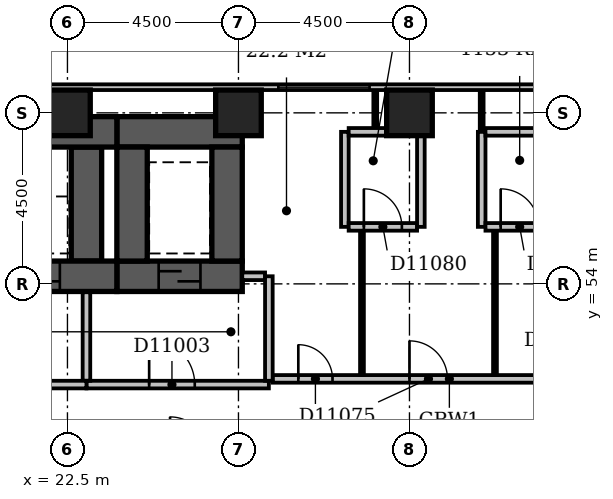
"""IFC4 building model, lengths in metres.
Left out: names, types, materials, properties, quantities, classifications, styles, units other than length and angle.
Written with IfcOpenShell. Run it as: python <this file> out.ifc"""

import sys

from ifc_helpers import new_model, si_unit, direction, frame, frame_2d, origin, origin_2d, place, context, subcontext, project, spatial, rectangle, extrude, element, fill, save


model = new_model("IFC4")
c1 = context("Model", 3, precision=1e-05, world=origin(), true_north=direction((0.0, 1.0)))
c2 = subcontext(c1, "Body", "Model", "MODEL_VIEW")
j1 = project(units=[si_unit("LENGTHUNIT", "METRE"), si_unit("PLANEANGLEUNIT", "RADIAN")], contexts=[c1])
p1 = place(None, origin())
s1 = spatial("IfcSite", under=j1, at=p1, CompositionType="ELEMENT")
p2 = place(p1, origin())
s2 = spatial("IfcBuilding", under=s1, at=p2, CompositionType="ELEMENT")
p3 = place(p2, frame((0.0, 0.0, 50.6)))
s3 = spatial("IfcBuildingStorey", under=s2, at=p3, CompositionType="ELEMENT", Elevation=50.6)
p4 = place(p3, frame((7.35, 54.2, -0.3), z_axis=(0.0, 0.0, 1.0), x_axis=(1.0, 0.0, 0.0)))
e1 = element("IfcWall", 1, at=p4, inside=s3, PredefinedType="SHEAR", context=c2, shape_type="SweptSolid", body=[
    extrude(rectangle(XDim=16.45, YDim=0.8, at=frame_2d((8.225, 0.0))), origin(), (0.0, 0.0, 1.0), 3.6),
])
p5 = place(p4, frame((1.35, 0.0, 0.3)))
e2 = element("IfcOpeningElement", 2, at=p5, cuts=e1, PredefinedType="OPENING", context=c2, shape_type="SweptSolid", body=[
    extrude(rectangle(XDim=1.1, YDim=2.1, at=frame_2d((0.55, 1.05))), frame((0.0, 0.412, 0.0), z_axis=(0.0, -1.0, 0.0), x_axis=(1.0, 0.0, 0.0)), (0.0, 0.0, 1.0), 0.824),
])
p6 = place(p4, frame((3.85, 0.0, 0.3)))
e3 = element("IfcOpeningElement", 3, at=p6, cuts=e1, PredefinedType="OPENING", context=c2, shape_type="SweptSolid", body=[
    extrude(rectangle(XDim=1.1, YDim=2.1, at=frame_2d((0.55, 1.05))), frame((0.0, 0.412, 0.0), z_axis=(0.0, -1.0, 0.0), x_axis=(1.0, 0.0, 0.0)), (0.0, 0.0, 1.0), 0.824),
])
p7 = place(p4, frame((6.35, 0.0, 0.3)))
e4 = element("IfcOpeningElement", 4, at=p7, cuts=e1, PredefinedType="OPENING", context=c2, shape_type="SweptSolid", body=[
    extrude(rectangle(XDim=1.1, YDim=2.1, at=frame_2d((0.55, 1.05))), frame((0.0, 0.412, 0.0), z_axis=(0.0, -1.0, 0.0), x_axis=(1.0, 0.0, 0.0)), (0.0, 0.0, 1.0), 0.824),
])
p8 = place(p4, frame((8.85, 0.0, 0.3)))
e5 = element("IfcOpeningElement", 5, at=p8, cuts=e1, PredefinedType="OPENING", context=c2, shape_type="SweptSolid", body=[
    extrude(rectangle(XDim=1.1, YDim=2.1, at=frame_2d((0.55, 1.05))), frame((0.0, 0.412, 0.0), z_axis=(0.0, -1.0, 0.0), x_axis=(1.0, 0.0, 0.0)), (0.0, 0.0, 1.0), 0.824),
])
p9 = place(p4, frame((11.35, 0.0, 0.3)))
e6 = element("IfcOpeningElement", 6, at=p9, cuts=e1, PredefinedType="OPENING", context=c2, shape_type="SweptSolid", body=[
    extrude(rectangle(XDim=1.1, YDim=2.1, at=frame_2d((0.55, 1.05))), frame((0.0, 0.412, 0.0), z_axis=(0.0, -1.0, 0.0), x_axis=(1.0, 0.0, 0.0)), (0.0, 0.0, 1.0), 0.824),
])
p10 = place(p4, frame((13.85, 0.0, 0.3)))
e7 = element("IfcOpeningElement", 7, at=p10, cuts=e1, PredefinedType="OPENING", context=c2, shape_type="SweptSolid", body=[
    extrude(rectangle(XDim=1.1, YDim=2.1, at=frame_2d((0.55, 1.05))), frame((0.0, 0.412, 0.0), z_axis=(0.0, -1.0, 0.0), x_axis=(1.0, 0.0, 0.0)), (0.0, 0.0, 1.0), 0.824),
])
p11 = place(p3, frame((7.35, 58.0, -0.3), z_axis=(0.0, 0.0, 1.0), x_axis=(1.0, 0.0, 0.0)))
e8 = element("IfcWall", 8, at=p11, inside=s3, PredefinedType="SHEAR", context=c2, shape_type="SweptSolid", body=[
    extrude(rectangle(XDim=16.45, YDim=0.8, at=frame_2d((8.225, 0.0))), origin(), (0.0, 0.0, 1.0), 3.6),
])
p12 = place(p3, frame((23.0, 54.6, -0.3), z_axis=(0.0, 0.0, 1.0), x_axis=(0.0, 1.0, 0.0)))
e9 = element("IfcWall", 9, at=p12, inside=s3, PredefinedType="SHEAR", context=c2, shape_type="SweptSolid", body=[
    extrude(rectangle(XDim=3.0, YDim=0.8, at=frame_2d((1.5, 0.0))), origin(), (0.0, 0.0, 1.0), 3.6),
])
p13 = place(p3, frame((23.8, 54.2, -0.3), z_axis=(0.0, 0.0, 1.0), x_axis=(1.0, 0.0, 0.0)))
e10 = element("IfcWall", 10, at=p13, inside=s3, PredefinedType="SHEAR", context=c2, shape_type="SweptSolid", body=[
    extrude(rectangle(XDim=3.3, YDim=0.8, at=frame_2d((1.65, 0.0))), origin(), (0.0, 0.0, 1.0), 3.6),
])
p14 = place(p13, frame((1.1, 0.0, 0.3)))
e11 = element("IfcOpeningElement", 11, at=p14, cuts=e10, PredefinedType="OPENING", context=c2, shape_type="SweptSolid", body=[
    extrude(rectangle(XDim=1.1, YDim=2.1, at=frame_2d((0.55, 1.05))), frame((0.0, 0.412, 0.0), z_axis=(0.0, -1.0, 0.0), x_axis=(1.0, 0.0, 0.0)), (0.0, 0.0, 1.0), 0.824),
])
p15 = place(p3, frame((23.8, 58.0, -0.3), z_axis=(0.0, 0.0, 1.0), x_axis=(1.0, 0.0, 0.0)))
e12 = element("IfcWall", 12, at=p15, inside=s3, PredefinedType="SHEAR", context=c2, shape_type="SweptSolid", body=[
    extrude(rectangle(XDim=3.3, YDim=0.8, at=frame_2d((1.65, 0.0))), origin(), (0.0, 0.0, 1.0), 3.6),
])
for number, where, z_axis, x_axis in (
    (13, (24.2, 54.6, -0.3), (0.0, 0.0, 1.0), (0.0, 1.0, 0.0)),
    (14, (26.7, 54.6, -0.3), (0.0, 0.0, 1.0), (0.0, 1.0, 0.0)),
):
    element("IfcWall", number, at=place(p3, frame(where, z_axis=z_axis, x_axis=x_axis)), inside=s3, PredefinedType="SHEAR", context=c2, shape_type="SweptSolid", body=[
        extrude(rectangle(XDim=3.0, YDim=0.8, at=frame_2d((1.5, 0.0))), origin(), (0.0, 0.0, 1.0), 3.6),
    ])
for number, where, z_axis, x_axis in (
    (15, (22.5, 58.5, -0.3), (0.0, 0.0, 1.0), (1.0, 0.0, 0.0)),
    (16, (27.0, 58.5, -0.3), (0.0, 0.0, 1.0), (1.0, 0.0, 0.0)),
    (17, (31.5, 58.5, -0.3), (0.0, 0.0, 1.0), (1.0, 0.0, 0.0)),
):
    element("IfcColumn", number, at=place(p3, frame(where, z_axis=z_axis, x_axis=x_axis)), inside=s3, PredefinedType="COLUMN", context=c2, shape_type="SweptSolid", body=[
        extrude(rectangle(XDim=1.2, YDim=1.2, at=origin_2d()), origin(), (0.0, 0.0, 1.0), 3.6),
    ])
p16 = place(p3, frame((68.1, 59.175, 0.0), z_axis=(0.0, 0.0, 1.0), x_axis=(-1.0, 0.0, 0.0)))
e18 = element("IfcWall", 18, at=p16, inside=s3, PredefinedType="STANDARD", context=c2, shape_type="SweptSolid", body=[
    extrude(rectangle(XDim=68.85, YDim=0.15, at=frame_2d((34.425, 0.0))), origin(), (0.0, 0.0, 1.0), 2.7),
])
p17 = place(p16, frame((2.977, 0.0, 0.6)))
e19 = element("IfcOpeningElement", 19, at=p17, cuts=e18, PredefinedType="OPENING", context=c2, shape_type="SweptSolid", body=[
    extrude(rectangle(XDim=1.2, YDim=1.8, at=frame_2d((0.6, 0.9))), frame((0.0, 0.087, 0.0), z_axis=(0.0, -1.0, 0.0), x_axis=(1.0, 0.0, 0.0)), (0.0, 0.0, 1.0), 0.174),
])
p18 = place(p16, frame((6.15, 0.0, 0.6)))
e20 = element("IfcOpeningElement", 20, at=p18, cuts=e18, PredefinedType="OPENING", context=c2, shape_type="SweptSolid", body=[
    extrude(rectangle(XDim=2.4, YDim=1.8, at=frame_2d((1.2, 0.9))), frame((0.0, 0.087, 0.0), z_axis=(0.0, -1.0, 0.0), x_axis=(1.0, 0.0, 0.0)), (0.0, 0.0, 1.0), 0.174),
])
p19 = place(p16, frame((37.65, 0.0, 0.6)))
e21 = element("IfcOpeningElement", 21, at=p19, cuts=e18, PredefinedType="OPENING", context=c2, shape_type="SweptSolid", body=[
    extrude(rectangle(XDim=2.4, YDim=1.8, at=frame_2d((1.2, 0.9))), frame((0.0, 0.087, 0.0), z_axis=(0.0, -1.0, 0.0), x_axis=(1.0, 0.0, 0.0)), (0.0, 0.0, 1.0), 0.174),
])
p20 = place(p3, frame((8.0, 51.35, 0.0), z_axis=(0.0, 0.0, 1.0), x_axis=(1.0, 0.0, 0.0)))
e22 = element("IfcWall", 22, at=p20, inside=s3, PredefinedType="PARTITIONING", context=c2, shape_type="SweptSolid", body=[
    extrude(rectangle(XDim=15.0, YDim=0.2, at=frame_2d((7.5, 0.0))), origin(), (0.0, 0.0, 1.0), 3.3),
])
p21 = place(p20, frame((3.4, 0.0, 0.0)))
e23 = element("IfcOpeningElement", 23, at=p21, cuts=e22, PredefinedType="OPENING", context=c2, shape_type="SweptSolid", body=[
    extrude(rectangle(XDim=1.2, YDim=2.1, at=frame_2d((0.6, 1.05))), frame((0.0, 0.112, 0.0), z_axis=(0.0, -1.0, 0.0), x_axis=(1.0, 0.0, 0.0)), (0.0, 0.0, 1.0), 0.224),
])
p22 = place(p20, frame((9.4, 0.0, 0.0)))
e24 = element("IfcOpeningElement", 24, at=p22, cuts=e22, PredefinedType="OPENING", context=c2, shape_type="SweptSolid", body=[
    extrude(rectangle(XDim=1.2, YDim=2.1, at=frame_2d((0.6, 1.05))), frame((0.0, 0.112, 0.0), z_axis=(0.0, -1.0, 0.0), x_axis=(1.0, 0.0, 0.0)), (0.0, 0.0, 1.0), 0.224),
])
p23 = place(p3, frame((23.0, 51.45, 0.0), z_axis=(0.0, 0.0, 1.0), x_axis=(0.0, 1.0, 0.0)))
e25 = element("IfcWall", 25, at=p23, inside=s3, PredefinedType="PARTITIONING", context=c2, shape_type="SweptSolid", body=[
    extrude(rectangle(XDim=2.33, YDim=0.2, at=frame_2d((1.165, 0.0))), origin(), (0.0, 0.0, 1.0), 3.3),
])
p24 = place(p3, frame((23.0, 51.35, 0.0), z_axis=(0.0, 0.0, 1.0), x_axis=(1.0, 0.0, 0.0)))
e26 = element("IfcWall", 26, at=p24, inside=s3, PredefinedType="PARTITIONING", context=c2, shape_type="SweptSolid", body=[
    extrude(rectangle(XDim=4.8, YDim=0.2, at=frame_2d((2.4, 0.0))), origin(), (0.0, 0.0, 1.0), 3.3),
])
p25 = place(p24, frame((1.65, 0.0, 0.0)))
e27 = element("IfcOpeningElement", 27, at=p25, cuts=e26, PredefinedType="OPENING", context=c2, shape_type="SweptSolid", body=[
    extrude(rectangle(XDim=1.2, YDim=2.1, at=frame_2d((0.6, 1.05))), frame((0.0, 0.112, 0.0), z_axis=(0.0, -1.0, 0.0), x_axis=(1.0, 0.0, 0.0)), (0.0, 0.0, 1.0), 0.224),
])
p26 = place(p3, frame((27.8, 51.45, 0.0), z_axis=(0.0, 0.0, 1.0), x_axis=(0.0, 1.0, 0.0)))
e28 = element("IfcWall", 28, at=p26, inside=s3, PredefinedType="PARTITIONING", context=c2, shape_type="SweptSolid", body=[
    extrude(rectangle(XDim=2.75, YDim=0.2, at=frame_2d((1.375, 0.0))), origin(), (0.0, 0.0, 1.0), 3.3),
])
p27 = place(p3, frame((27.1, 54.2, 0.0), z_axis=(0.0, 0.0, 1.0), x_axis=(1.0, 0.0, 0.0)))
e29 = element("IfcWall", 29, at=p27, inside=s3, PredefinedType="PARTITIONING", context=c2, shape_type="SweptSolid", body=[
    extrude(rectangle(XDim=0.6, YDim=0.2, at=frame_2d((0.3, 0.0))), origin(), (0.0, 0.0, 1.0), 3.3),
])
p28 = place(p3, frame((27.9, 51.5, 0.0), z_axis=(0.0, 0.0, 1.0), x_axis=(1.0, 0.0, 0.0)))
e30 = element("IfcWall", 30, at=p28, inside=s3, PredefinedType="PARTITIONING", context=c2, shape_type="SweptSolid", body=[
    extrude(rectangle(XDim=9.3, YDim=0.2, at=frame_2d((4.65, 0.0))), origin(), (0.0, 0.0, 1.0), 3.3),
])
p29 = place(p28, frame((0.675, 0.0, 0.0)))
e31 = element("IfcOpeningElement", 31, at=p29, cuts=e30, PredefinedType="OPENING", context=c2, shape_type="SweptSolid", body=[
    extrude(rectangle(XDim=0.9, YDim=2.1, at=frame_2d((0.45, 1.05))), frame((0.0, 0.112, 0.0), z_axis=(0.0, -1.0, 0.0), x_axis=(1.0, 0.0, 0.0)), (0.0, 0.0, 1.0), 0.224),
])
p30 = place(p28, frame((3.6, 0.0, 0.0)))
e32 = element("IfcOpeningElement", 32, at=p30, cuts=e30, PredefinedType="OPENING", context=c2, shape_type="SweptSolid", body=[
    extrude(rectangle(XDim=1.0, YDim=2.1, at=frame_2d((0.5, 1.05))), frame((0.0, 0.112, 0.0), z_axis=(0.0, -1.0, 0.0), x_axis=(1.0, 0.0, 0.0)), (0.0, 0.0, 1.0), 0.224),
])
p31 = place(p28, frame((7.125, 0.0, 0.0)))
e33 = element("IfcOpeningElement", 33, at=p31, cuts=e30, PredefinedType="OPENING", context=c2, shape_type="SweptSolid", body=[
    extrude(rectangle(XDim=1.0, YDim=2.1, at=frame_2d((0.5, 1.05))), frame((0.0, 0.112, 0.0), z_axis=(0.0, -1.0, 0.0), x_axis=(1.0, 0.0, 0.0)), (0.0, 0.0, 1.0), 0.224),
])
for number, where, z_axis, x_axis in (
    (34, (30.25, 51.6, 0.0), (0.0, 0.0, 1.0), (0.0, 1.0, 0.0)),
    (35, (33.75, 51.6, 0.0), (0.0, 0.0, 1.0), (0.0, 1.0, 0.0)),
):
    element("IfcWall", number, at=place(p3, frame(where, z_axis=z_axis, x_axis=x_axis)), inside=s3, PredefinedType="PARTITIONING", context=c2, shape_type="SweptSolid", body=[
        extrude(rectangle(XDim=3.8, YDim=0.1, at=frame_2d((1.9, 0.0))), origin(), (0.0, 0.0, 1.0), 3.3),
    ])
p32 = place(p3, frame((29.8, 55.5, 0.0), z_axis=(0.0, 0.0, 1.0), x_axis=(0.0, 1.0, 0.0)))
e36 = element("IfcWall", 36, at=p32, inside=s3, PredefinedType="PARTITIONING", context=c2, shape_type="SweptSolid", body=[
    extrude(rectangle(XDim=2.5, YDim=0.2, at=frame_2d((1.25, 0.0))), origin(), (0.0, 0.0, 1.0), 3.3),
])
p33 = place(p3, frame((29.9, 55.5, 0.0), z_axis=(0.0, 0.0, 1.0), x_axis=(1.0, 0.0, 0.0)))
e37 = element("IfcWall", 37, at=p33, inside=s3, PredefinedType="PARTITIONING", context=c2, shape_type="SweptSolid", body=[
    extrude(rectangle(XDim=1.8, YDim=0.2, at=frame_2d((0.9, 0.0))), origin(), (0.0, 0.0, 1.0), 3.3),
])
p34 = place(p33, frame((0.4, 0.0, 0.0)))
e38 = element("IfcOpeningElement", 38, at=p34, cuts=e37, PredefinedType="OPENING", context=c2, shape_type="SweptSolid", body=[
    extrude(rectangle(XDim=1.0, YDim=2.1, at=frame_2d((0.5, 1.05))), frame((0.0, 0.112, 0.0), z_axis=(0.0, -1.0, 0.0), x_axis=(1.0, 0.0, 0.0)), (0.0, 0.0, 1.0), 0.224),
])
for number, where, z_axis, x_axis in (
    (39, (31.8, 55.5, 0.0), (0.0, 0.0, 1.0), (0.0, 1.0, 0.0)),
    (40, (33.4, 55.5, 0.0), (0.0, 0.0, 1.0), (0.0, 1.0, 0.0)),
):
    element("IfcWall", number, at=place(p3, frame(where, z_axis=z_axis, x_axis=x_axis)), inside=s3, PredefinedType="PARTITIONING", context=c2, shape_type="SweptSolid", body=[
        extrude(rectangle(XDim=2.5, YDim=0.2, at=frame_2d((1.25, 0.0))), origin(), (0.0, 0.0, 1.0), 3.3),
    ])
p35 = place(p3, frame((33.5, 55.5, 0.0), z_axis=(0.0, 0.0, 1.0), x_axis=(1.0, 0.0, 0.0)))
e41 = element("IfcWall", 41, at=p35, inside=s3, PredefinedType="PARTITIONING", context=c2, shape_type="SweptSolid", body=[
    extrude(rectangle(XDim=1.8, YDim=0.2, at=frame_2d((0.9, 0.0))), origin(), (0.0, 0.0, 1.0), 3.3),
])
p36 = place(p35, frame((0.4, 0.0, 0.0)))
e42 = element("IfcOpeningElement", 42, at=p36, cuts=e41, PredefinedType="OPENING", context=c2, shape_type="SweptSolid", body=[
    extrude(rectangle(XDim=1.0, YDim=2.1, at=frame_2d((0.5, 1.05))), frame((0.0, 0.112, 0.0), z_axis=(0.0, -1.0, 0.0), x_axis=(1.0, 0.0, 0.0)), (0.0, 0.0, 1.0), 0.224),
])
p37 = place(p3, frame((29.9, 58.0, 0.0), z_axis=(0.0, 0.0, 1.0), x_axis=(1.0, 0.0, 0.0)))
e43 = element("IfcWall", 43, at=p37, inside=s3, PredefinedType="PARTITIONING", context=c2, shape_type="SweptSolid", body=[
    extrude(rectangle(XDim=1.8, YDim=0.2, at=frame_2d((0.9, 0.0))), origin(), (0.0, 0.0, 1.0), 3.3),
])
p38 = place(p3, frame((33.4, 58.0, 0.0), z_axis=(0.0, 0.0, 1.0), x_axis=(0.0, 1.0, 0.0)))
e44 = element("IfcWall", 44, at=p38, inside=s3, PredefinedType="PARTITIONING", context=c2, shape_type="SweptSolid", body=[
    extrude(rectangle(XDim=1.1, YDim=0.1, at=frame_2d((0.55, 0.0))), origin(), (0.0, 0.0, 1.0), 3.3),
])
p39 = place(p3, frame((33.5, 58.0, 0.0), z_axis=(0.0, 0.0, 1.0), x_axis=(1.0, 0.0, 0.0)))
e45 = element("IfcWall", 45, at=p39, inside=s3, PredefinedType="PARTITIONING", context=c2, shape_type="SweptSolid", body=[
    extrude(rectangle(XDim=1.8, YDim=0.2, at=frame_2d((0.9, 0.0))), origin(), (0.0, 0.0, 1.0), 3.3),
])
p40 = place(p3, frame((30.6, 58.1, 0.0), z_axis=(0.0, 0.0, 1.0), x_axis=(0.0, 1.0, 0.0)))
e46 = element("IfcWall", 46, at=p40, inside=s3, PredefinedType="PARTITIONING", context=c2, shape_type="SweptSolid", body=[
    extrude(rectangle(XDim=1.0, YDim=0.1, at=frame_2d((0.5, 0.0))), origin(), (0.0, 0.0, 1.0), 3.3),
])
p41 = place(p19, origin())
e47 = element("IfcWindow", 47, at=p41, inside=s3, PartitioningType="SINGLE_PANEL", PredefinedType="WINDOW", context=c2, shape_type="SweptSolid", body=[
    extrude(rectangle(XDim=2.4, YDim=1.8, at=frame_2d((1.2, 0.9))), frame((0.0, 0.03, 0.0), z_axis=(0.0, -1.0, 0.0), x_axis=(1.0, 0.0, 0.0)), (0.0, 0.0, 1.0), 0.06),
])
fill(e21, e47)
p42 = place(p25, origin())
e48 = element("IfcDoor", 48, at=p42, inside=s3, OperationType="SINGLE_SWING_LEFT", PredefinedType="DOOR", context=c2, shape_type="SweptSolid", body=[
    extrude(rectangle(XDim=1.2, YDim=2.1, at=frame_2d((0.6, 1.05))), frame((0.0, 0.025, 0.0), z_axis=(0.0, -1.0, 0.0), x_axis=(1.0, 0.0, 0.0)), (0.0, 0.0, 1.0), 0.05),
])
fill(e27, e48)
p43 = place(p14, origin())
e49 = element("IfcDoor", 49, at=p43, inside=s3, OperationType="SLIDING_TO_LEFT", PredefinedType="DOOR", context=c2, shape_type="SweptSolid", body=[
    extrude(rectangle(XDim=1.1, YDim=2.1, at=frame_2d((0.55, 1.05))), frame((0.0, 0.025, 0.0), z_axis=(0.0, -1.0, 0.0), x_axis=(1.0, 0.0, 0.0)), (0.0, 0.0, 1.0), 0.05),
])
fill(e11, e49)
p44 = place(p10, origin())
e50 = element("IfcDoor", 50, at=p44, inside=s3, OperationType="SLIDING_TO_LEFT", PredefinedType="DOOR", context=c2, shape_type="SweptSolid", body=[
    extrude(rectangle(XDim=1.1, YDim=2.1, at=frame_2d((0.55, 1.05))), frame((0.0, 0.025, 0.0), z_axis=(0.0, -1.0, 0.0), x_axis=(1.0, 0.0, 0.0)), (0.0, 0.0, 1.0), 0.05),
])
fill(e7, e50)
p45 = place(p29, origin())
e51 = element("IfcDoor", 51, at=p45, inside=s3, OperationType="SINGLE_SWING_LEFT", PredefinedType="DOOR", context=c2, shape_type="SweptSolid", body=[
    extrude(rectangle(XDim=0.9, YDim=2.1, at=frame_2d((0.45, 1.05))), frame((0.0, 0.025, 0.0), z_axis=(0.0, -1.0, 0.0), x_axis=(1.0, 0.0, 0.0)), (0.0, 0.0, 1.0), 0.05),
])
fill(e31, e51)
p46 = place(p30, origin())
e52 = element("IfcDoor", 52, at=p46, inside=s3, OperationType="SINGLE_SWING_LEFT", PredefinedType="DOOR", context=c2, shape_type="SweptSolid", body=[
    extrude(rectangle(XDim=1.0, YDim=2.1, at=frame_2d((0.5, 1.05))), frame((0.0, 0.025, 0.0), z_axis=(0.0, -1.0, 0.0), x_axis=(1.0, 0.0, 0.0)), (0.0, 0.0, 1.0), 0.05),
])
fill(e32, e52)
p47 = place(p34, origin())
e53 = element("IfcDoor", 53, at=p47, inside=s3, OperationType="SINGLE_SWING_LEFT", PredefinedType="DOOR", context=c2, shape_type="SweptSolid", body=[
    extrude(rectangle(XDim=1.0, YDim=2.1, at=frame_2d((0.5, 1.05))), frame((0.0, 0.025, 0.0), z_axis=(0.0, -1.0, 0.0), x_axis=(1.0, 0.0, 0.0)), (0.0, 0.0, 1.0), 0.05),
])
fill(e38, e53)
p48 = place(p36, origin())
e54 = element("IfcDoor", 54, at=p48, inside=s3, OperationType="SINGLE_SWING_LEFT", PredefinedType="DOOR", context=c2, shape_type="SweptSolid", body=[
    extrude(rectangle(XDim=1.0, YDim=2.1, at=frame_2d((0.5, 1.05))), frame((0.0, 0.025, 0.0), z_axis=(0.0, -1.0, 0.0), x_axis=(1.0, 0.0, 0.0)), (0.0, 0.0, 1.0), 0.05),
])
fill(e42, e54)
save(model, sys.argv[1])
